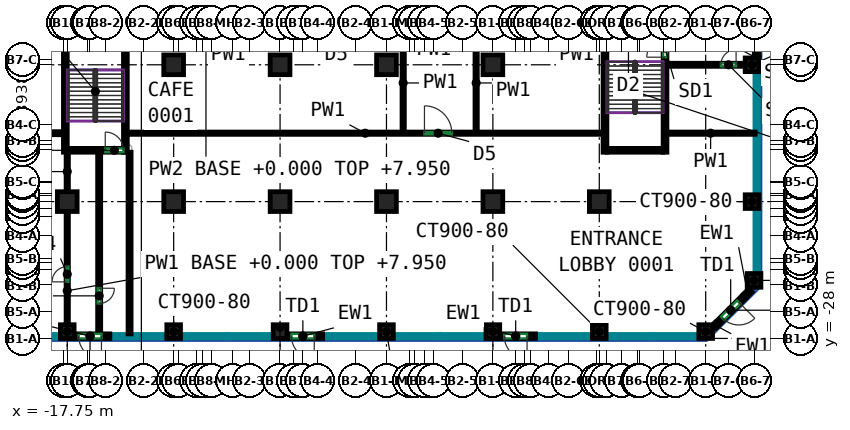
"""IFC4 building model, lengths in metres.
Left out: names, types, materials, properties, quantities, classifications, styles, units other than length and angle.
Written with IfcOpenShell. Run it as: python <this file> out.ifc"""

import sys

from ifc_helpers import new_model, si_unit, direction, frame, frame_2d, origin, origin_2d, place, context, subcontext, project, spatial, rectangle, extrude, source, transform, mapped, element, fill, save


model = new_model("IFC4")
c1 = context("Model", 3, precision=1e-05, world=origin(), true_north=direction((0.0, 1.0)))
c2 = subcontext(c1, "Body", "Model", "MODEL_VIEW")
j1 = project(units=[si_unit("LENGTHUNIT", "METRE"), si_unit("PLANEANGLEUNIT", "RADIAN")], contexts=[c1])
p1 = place(None, origin())
s1 = spatial("IfcSite", under=j1, at=p1, CompositionType="ELEMENT")
p2 = place(p1, origin())
s2 = spatial("IfcBuilding", under=s1, at=p2, CompositionType="ELEMENT")
p3 = place(p2, origin())
s3 = spatial("IfcBuildingStorey", under=s2, at=p3, CompositionType="ELEMENT", Elevation=0.0)
m1 = source(origin(), c2, "Body", "SweptSolid", [
    extrude(rectangle(XDim=0.9, YDim=0.9, at=origin_2d()), origin(), (0.0, 0.0, 1.0), 8.6),
])
p4 = place(p3, frame((-17.5, -27.55, 0.0), z_axis=(0.0, 0.0, 1.0), x_axis=(1.0, 0.0, 0.0)))
e1 = element("IfcColumn", 1, at=p4, inside=s3, PredefinedType="COLUMN", context=c2, shape_type="MappedRepresentation", body=[
    mapped(m1, transform((0.0, 0.0, 0.0))),
])
m2 = source(origin(), c2, "Body", "SweptSolid", [
    extrude(rectangle(XDim=1.3, YDim=1.3, at=origin_2d()), origin(), (0.0, 0.0, 1.0), 8.6),
])
p5 = place(p3, frame((-17.5, -19.0, 0.0), z_axis=(0.0, 0.0, 1.0), x_axis=(1.0, 0.0, 0.0)))
e2 = element("IfcColumn", 2, at=p5, inside=s3, PredefinedType="COLUMN", context=c2, shape_type="MappedRepresentation", body=[
    mapped(m2, transform((0.0, 0.0, 0.0))),
])
p6 = place(p3, frame((-10.5, -27.55, 0.0), z_axis=(0.0, 0.0, 1.0), x_axis=(1.0, 0.0, 0.0)))
e3 = element("IfcColumn", 3, at=p6, inside=s3, PredefinedType="COLUMN", context=c2, shape_type="MappedRepresentation", body=[
    mapped(m1, transform((0.0, 0.0, 0.0))),
])
for number, where, z_axis, x_axis in (
    (4, (-10.5, -19.0, 0.0), (0.0, 0.0, 1.0), (1.0, 0.0, 0.0)),
    (5, (-10.5, -10.0, 0.0), (0.0, 0.0, 1.0), (1.0, 0.0, 0.0)),
):
    element("IfcColumn", number, at=place(p3, frame(where, z_axis=z_axis, x_axis=x_axis)), inside=s3, PredefinedType="COLUMN", context=c2, shape_type="MappedRepresentation", body=[
        mapped(m2, transform((0.0, 0.0, 0.0))),
    ])
p7 = place(p3, frame((-3.5, -27.55, 0.0), z_axis=(0.0, 0.0, 1.0), x_axis=(1.0, 0.0, 0.0)))
e6 = element("IfcColumn", 6, at=p7, inside=s3, PredefinedType="COLUMN", context=c2, shape_type="MappedRepresentation", body=[
    mapped(m1, transform((0.0, 0.0, 0.0))),
])
for number, where, z_axis, x_axis in (
    (7, (-3.5, -19.0, 0.0), (0.0, 0.0, 1.0), (1.0, 0.0, 0.0)),
    (8, (-3.5, -10.0, 0.0), (0.0, 0.0, 1.0), (1.0, 0.0, 0.0)),
):
    element("IfcColumn", number, at=place(p3, frame(where, z_axis=z_axis, x_axis=x_axis)), inside=s3, PredefinedType="COLUMN", context=c2, shape_type="MappedRepresentation", body=[
        mapped(m2, transform((0.0, 0.0, 0.0))),
    ])
p8 = place(p3, frame((3.5, -27.55, 0.0), z_axis=(0.0, 0.0, 1.0), x_axis=(1.0, 0.0, 0.0)))
e9 = element("IfcColumn", 9, at=p8, inside=s3, PredefinedType="COLUMN", context=c2, shape_type="MappedRepresentation", body=[
    mapped(m1, transform((0.0, 0.0, 0.0))),
])
for number, where, z_axis, x_axis in (
    (10, (3.5, -19.0, 0.0), (0.0, 0.0, 1.0), (1.0, 0.0, 0.0)),
    (11, (3.5, -10.0, 0.0), (0.0, 0.0, 1.0), (1.0, 0.0, 0.0)),
):
    element("IfcColumn", number, at=place(p3, frame(where, z_axis=z_axis, x_axis=x_axis)), inside=s3, PredefinedType="COLUMN", context=c2, shape_type="MappedRepresentation", body=[
        mapped(m2, transform((0.0, 0.0, 0.0))),
    ])
p9 = place(p3, frame((10.5, -27.55, 0.0), z_axis=(0.0, 0.0, 1.0), x_axis=(1.0, 0.0, 0.0)))
e12 = element("IfcColumn", 12, at=p9, inside=s3, PredefinedType="COLUMN", context=c2, shape_type="MappedRepresentation", body=[
    mapped(m1, transform((0.0, 0.0, 0.0))),
])
for number, where, z_axis, x_axis in (
    (13, (10.5, -19.0, 0.0), (0.0, 0.0, 1.0), (1.0, 0.0, 0.0)),
    (14, (10.5, -10.0, 0.0), (0.0, 0.0, 1.0), (1.0, 0.0, 0.0)),
):
    element("IfcColumn", number, at=place(p3, frame(where, z_axis=z_axis, x_axis=x_axis)), inside=s3, PredefinedType="COLUMN", context=c2, shape_type="MappedRepresentation", body=[
        mapped(m2, transform((0.0, 0.0, 0.0))),
    ])
p10 = place(p3, frame((17.5, -27.55, 0.0), z_axis=(0.0, 0.0, 1.0), x_axis=(1.0, 0.0, 0.0)))
e15 = element("IfcColumn", 15, at=p10, inside=s3, PredefinedType="COLUMN", context=c2, shape_type="MappedRepresentation", body=[
    mapped(m1, transform((0.0, 0.0, 0.0))),
])
p11 = place(p3, frame((17.5, -19.0, 0.0), z_axis=(0.0, 0.0, 1.0), x_axis=(1.0, 0.0, 0.0)))
e16 = element("IfcColumn", 16, at=p11, inside=s3, PredefinedType="COLUMN", context=c2, shape_type="MappedRepresentation", body=[
    mapped(m2, transform((0.0, 0.0, 0.0))),
])
for number, where, z_axis, x_axis in (
    (17, (24.5, -27.55, 0.0), (0.0, 0.0, 1.0), (1.0, 0.0, 0.0)),
    (18, (27.55, -19.0, 0.0), (0.0, 0.0, 1.0), (1.0, 0.0, 0.0)),
    (19, (27.55, -10.0, 0.0), (0.0, 0.0, 1.0), (1.0, 0.0, 0.0)),
    (20, (27.682, -24.182, 0.0), (0.0, 0.0, 1.0), (1.0, 0.0, 0.0)),
):
    element("IfcColumn", number, at=place(p3, frame(where, z_axis=z_axis, x_axis=x_axis)), inside=s3, PredefinedType="COLUMN", context=c2, shape_type="MappedRepresentation", body=[
        mapped(m1, transform((0.0, 0.0, 0.0))),
    ])
m3 = source(origin(), c2, "Body", "SweptSolid", [
    extrude(rectangle(XDim=8.0, YDim=0.25, at=frame_2d((4.0, 0.0))), origin(), (0.0, 0.0, 1.0), 8.6),
])
for number, where, z_axis, x_axis in (
    (21, (-17.625, -15.75, 0.0), (0.0, 0.0, 1.0), (0.0, 1.0, 0.0)),
    (22, (-13.675, -15.75, 0.0), (0.0, 0.0, 1.0), (0.0, 1.0, 0.0)),
):
    element("IfcWall", number, at=place(p3, frame(where, z_axis=z_axis, x_axis=x_axis)), inside=s3, PredefinedType="SHEAR", context=c2, shape_type="MappedRepresentation", body=[
        mapped(m3, transform((0.0, 0.0, 0.0))),
    ])
m4 = source(origin(), c2, "Body", "SweptSolid", [
    extrude(rectangle(XDim=3.7, YDim=0.25, at=frame_2d((1.85, 0.0))), origin(), (0.0, 0.0, 1.0), 8.6),
])
p12 = place(p3, frame((-17.5, -15.625, 0.0), z_axis=(0.0, 0.0, 1.0), x_axis=(1.0, 0.0, 0.0)))
e23 = element("IfcWall", 23, at=p12, inside=s3, PredefinedType="SHEAR", context=c2, shape_type="MappedRepresentation", body=[
    mapped(m4, transform((0.0, 0.0, 0.0))),
])
p13 = place(p12, frame((2.5, 0.0, 0.0)))
e24 = element("IfcOpeningElement", 24, at=p13, cuts=e23, PredefinedType="OPENING", context=c2, shape_type="SweptSolid", body=[
    extrude(rectangle(XDim=1.2, YDim=2.1, at=frame_2d((0.6, 1.05))), frame((0.0, 0.135, 0.0), z_axis=(0.0, -1.0, 0.0), x_axis=(1.0, 0.0, 0.0)), (0.0, 0.0, 1.0), 0.27),
])
p14 = place(p3, frame((17.875, -15.75, 0.0), z_axis=(0.0, 0.0, 1.0), x_axis=(0.0, 1.0, 0.0)))
e25 = element("IfcWall", 25, at=p14, inside=s3, PredefinedType="SHEAR", context=c2, shape_type="MappedRepresentation", body=[
    mapped(m3, transform((0.0, 0.0, 0.0))),
])
p15 = place(p3, frame((21.825, -15.75, 0.0), z_axis=(0.0, 0.0, 1.0), x_axis=(0.0, 1.0, 0.0)))
e26 = element("IfcWall", 26, at=p15, inside=s3, PredefinedType="SHEAR", context=c2, shape_type="MappedRepresentation", body=[
    mapped(m3, transform((0.0, 0.0, 0.0))),
])
p16 = place(p15, frame((6.25, 0.0, 0.0)))
e27 = element("IfcOpeningElement", 27, at=p16, cuts=e26, PredefinedType="OPENING", context=c2, shape_type="SweptSolid", body=[
    extrude(rectangle(XDim=1.2, YDim=2.1, at=frame_2d((0.6, 1.05))), frame((0.0, 0.135, 0.0), z_axis=(0.0, -1.0, 0.0), x_axis=(1.0, 0.0, 0.0)), (0.0, 0.0, 1.0), 0.27),
])
p17 = place(p3, frame((18.0, -15.625, 0.0), z_axis=(0.0, 0.0, 1.0), x_axis=(1.0, 0.0, 0.0)))
e28 = element("IfcWall", 28, at=p17, inside=s3, PredefinedType="SHEAR", context=c2, shape_type="MappedRepresentation", body=[
    mapped(m4, transform((0.0, 0.0, 0.0))),
])
m5 = source(origin(), c2, "Body", "SweptSolid", [
    extrude(rectangle(XDim=11.95, YDim=0.2, at=frame_2d((5.975, 0.0))), origin(), (0.0, 0.0, 1.0), 8.6),
])
p18 = place(p3, frame((-15.4, -15.75, 0.0), z_axis=(0.0, 0.0, 1.0), x_axis=(0.0, -1.0, 0.0)))
e29 = element("IfcWall", 29, at=p18, inside=s3, PredefinedType="SHEAR", context=c2, shape_type="MappedRepresentation", body=[
    mapped(m5, transform((0.0, 0.0, 0.0))),
])
p19 = place(p18, frame((8.95, 0.0, 0.0)))
e30 = element("IfcOpeningElement", 30, at=p19, cuts=e29, PredefinedType="OPENING", context=c2, shape_type="SweptSolid", body=[
    extrude(rectangle(XDim=1.0, YDim=2.1, at=frame_2d((0.5, 1.05))), frame((0.0, 0.11, 0.0), z_axis=(0.0, -1.0, 0.0), x_axis=(1.0, 0.0, 0.0)), (0.0, 0.0, 1.0), 0.22),
])
p20 = place(p3, frame((-13.4, -15.75, 0.0), z_axis=(0.0, 0.0, 1.0), x_axis=(0.0, -1.0, 0.0)))
e31 = element("IfcWall", 31, at=p20, inside=s3, PredefinedType="SHEAR", context=c2, shape_type="MappedRepresentation", body=[
    mapped(m5, transform((0.0, 0.0, 0.0))),
])
m6 = source(origin(), c2, "Body", "SweptSolid", [
    extrude(rectangle(XDim=5.75, YDim=0.2, at=frame_2d((2.875, 0.0))), origin(), (0.0, 0.0, 1.0), 8.6),
])
p21 = place(p3, frame((21.95, -10.0, 0.0), z_axis=(0.0, 0.0, 1.0), x_axis=(1.0, 0.0, 0.0)))
e32 = element("IfcWall", 32, at=p21, inside=s3, PredefinedType="SHEAR", context=c2, shape_type="MappedRepresentation", body=[
    mapped(m6, transform((0.0, 0.0, 0.0))),
])
p22 = place(p21, frame((3.55, 0.0, 0.0)))
e33 = element("IfcOpeningElement", 33, at=p22, cuts=e32, PredefinedType="OPENING", context=c2, shape_type="SweptSolid", body=[
    extrude(rectangle(XDim=1.0, YDim=2.1, at=frame_2d((0.5, 1.05))), frame((0.0, 0.11, 0.0), z_axis=(0.0, -1.0, 0.0), x_axis=(1.0, 0.0, 0.0)), (0.0, 0.0, 1.0), 0.22),
])
m7 = source(origin(), c2, "Body", "SweptSolid", [
    extrude(rectangle(XDim=2.6, YDim=0.3, at=frame_2d((1.3, 0.0))), origin(), (0.0, 0.0, 1.0), 8.6),
])
p23 = place(p3, frame((-14.7, -27.85, 0.0), z_axis=(0.0, 0.0, 1.0), x_axis=(-1.0, 0.0, 0.0)))
e34 = element("IfcWall", 34, at=p23, inside=s3, PredefinedType="SOLIDWALL", context=c2, shape_type="MappedRepresentation", body=[
    mapped(m7, transform((0.0, 0.0, 0.0))),
])
p24 = place(p23, frame((0.55, 0.0, 0.0)))
e35 = element("IfcOpeningElement", 35, at=p24, cuts=e34, PredefinedType="OPENING", context=c2, shape_type="SweptSolid", body=[
    extrude(rectangle(XDim=1.5, YDim=2.4, at=frame_2d((0.75, 1.2))), frame((0.0, 0.16, 0.0), z_axis=(0.0, -1.0, 0.0), x_axis=(1.0, 0.0, 0.0)), (0.0, 0.0, 1.0), 0.32),
])
p25 = place(p3, frame((-0.7, -27.85, 0.0), z_axis=(0.0, 0.0, 1.0), x_axis=(-1.0, 0.0, 0.0)))
e36 = element("IfcWall", 36, at=p25, inside=s3, PredefinedType="SOLIDWALL", context=c2, shape_type="MappedRepresentation", body=[
    mapped(m7, transform((0.0, 0.0, 0.0))),
])
p26 = place(p25, frame((0.55, 0.0, 0.0)))
e37 = element("IfcOpeningElement", 37, at=p26, cuts=e36, PredefinedType="OPENING", context=c2, shape_type="SweptSolid", body=[
    extrude(rectangle(XDim=1.5, YDim=2.4, at=frame_2d((0.75, 1.2))), frame((0.0, 0.16, 0.0), z_axis=(0.0, -1.0, 0.0), x_axis=(1.0, 0.0, 0.0)), (0.0, 0.0, 1.0), 0.32),
])
p27 = place(p3, frame((13.3, -27.85, 0.0), z_axis=(0.0, 0.0, 1.0), x_axis=(-1.0, 0.0, 0.0)))
e38 = element("IfcWall", 38, at=p27, inside=s3, PredefinedType="SOLIDWALL", context=c2, shape_type="MappedRepresentation", body=[
    mapped(m7, transform((0.0, 0.0, 0.0))),
])
p28 = place(p27, frame((0.55, 0.0, 0.0)))
e39 = element("IfcOpeningElement", 39, at=p28, cuts=e38, PredefinedType="OPENING", context=c2, shape_type="SweptSolid", body=[
    extrude(rectangle(XDim=1.5, YDim=2.4, at=frame_2d((0.75, 1.2))), frame((0.0, 0.16, 0.0), z_axis=(0.0, -1.0, 0.0), x_axis=(1.0, 0.0, 0.0)), (0.0, 0.0, 1.0), 0.32),
])
m8 = source(origin(), c2, "Body", "SweptSolid", [
    extrude(rectangle(XDim=0.22, YDim=0.3, at=frame_2d((0.11, 0.0))), origin(), (0.0, 0.0, 1.0), 8.6),
])
p29 = place(p3, frame((25.069, -27.219, 0.0), z_axis=(0.0, 0.0, 1.0), x_axis=(0.707106781187, 0.707106781187, 0.0)))
e40 = element("IfcWall", 40, at=p29, inside=s3, PredefinedType="SOLIDWALL", context=c2, shape_type="MappedRepresentation", body=[
    mapped(m8, transform((0.0, 0.0, 0.0))),
])
p30 = place(p3, frame((27.063, -25.225, 0.0), z_axis=(0.0, 0.0, 1.0), x_axis=(-0.707106781187, -0.707106781187, 0.0)))
e41 = element("IfcWall", 41, at=p30, inside=s3, PredefinedType="SOLIDWALL", context=c2, shape_type="MappedRepresentation", body=[
    mapped(m7, transform((0.0, 0.0, 0.0))),
])
p31 = place(p30, frame((0.55, 0.0, 0.0)))
e42 = element("IfcOpeningElement", 42, at=p31, cuts=e41, PredefinedType="OPENING", context=c2, shape_type="SweptSolid", body=[
    extrude(rectangle(XDim=1.5, YDim=2.4, at=frame_2d((0.75, 1.2))), frame((0.0, 0.16, 0.0), z_axis=(0.0, -1.0, 0.0), x_axis=(1.0, 0.0, 0.0)), (0.0, 0.0, 1.0), 0.32),
])
m9 = source(origin(), c2, "Body", "SweptSolid", [
    extrude(rectangle(XDim=0.538, YDim=0.3, at=frame_2d((0.269, 0.0))), origin(), (0.0, 0.0, 1.0), 8.6),
])
p32 = place(p3, frame((27.063, -25.225, 0.0), z_axis=(0.0, 0.0, 1.0), x_axis=(0.707333454284, 0.706880035403, 0.0)))
e43 = element("IfcWall", 43, at=p32, inside=s3, PredefinedType="SOLIDWALL", context=c2, shape_type="MappedRepresentation", body=[
    mapped(m9, transform((0.0, 0.0, 0.0))),
])
m10 = source(origin(), c2, "Body", "SweptSolid", [
    extrude(rectangle(XDim=0.25, YDim=0.3, at=frame_2d((0.125, 0.0))), origin(), (0.0, 0.0, 1.0), 8.6),
])
p33 = place(p3, frame((27.85, -9.55, 0.0), z_axis=(0.0, 0.0, 1.0), x_axis=(0.0, 1.0, 0.0)))
e44 = element("IfcWall", 44, at=p33, inside=s3, PredefinedType="SOLIDWALL", context=c2, shape_type="MappedRepresentation", body=[
    mapped(m10, transform((0.0, 0.0, 0.0))),
])
p34 = place(p3, frame((27.85, -6.7, 0.0), z_axis=(0.0, 0.0, 1.0), x_axis=(0.0, -1.0, 0.0)))
e45 = element("IfcWall", 45, at=p34, inside=s3, PredefinedType="SOLIDWALL", context=c2, shape_type="MappedRepresentation", body=[
    mapped(m7, transform((0.0, 0.0, 0.0))),
])
p35 = place(p34, frame((0.55, 0.0, 0.0)))
e46 = element("IfcOpeningElement", 46, at=p35, cuts=e45, PredefinedType="OPENING", context=c2, shape_type="SweptSolid", body=[
    extrude(rectangle(XDim=1.5, YDim=2.4, at=frame_2d((0.75, 1.2))), frame((0.0, 0.16, 0.0), z_axis=(0.0, -1.0, 0.0), x_axis=(1.0, 0.0, 0.0)), (0.0, 0.0, 1.0), 0.32),
])
p36 = place(p3, frame((21.9, -14.5, 0.0), z_axis=(0.0, 0.0, 1.0), x_axis=(1.0, 0.0, 0.0)))
e47 = element("IfcWall", 47, at=p36, inside=s3, PredefinedType="PARTITIONING", context=c2, shape_type="SweptSolid", body=[
    extrude(rectangle(XDim=5.85, YDim=0.15, at=frame_2d((2.925, 0.0))), origin(), (0.0, 0.0, 1.0), 8.6),
])
p37 = place(p3, frame((-13.6, -14.5, 0.0), z_axis=(0.0, 0.0, 1.0), x_axis=(1.0, 0.0, 0.0)))
e48 = element("IfcWall", 48, at=p37, inside=s3, PredefinedType="PARTITIONING", context=c2, shape_type="SweptSolid", body=[
    extrude(rectangle(XDim=31.4, YDim=0.15, at=frame_2d((15.7, 0.0))), origin(), (0.0, 0.0, 1.0), 8.6),
])
p38 = place(p37, frame((19.599, 0.0, 0.0)))
e49 = element("IfcOpeningElement", 49, at=p38, cuts=e48, PredefinedType="OPENING", context=c2, shape_type="SweptSolid", body=[
    extrude(rectangle(XDim=1.8, YDim=2.1, at=frame_2d((0.9, 1.05))), frame((0.0, 0.085, 0.0), z_axis=(0.0, -1.0, 0.0), x_axis=(1.0, 0.0, 0.0)), (0.0, 0.0, 1.0), 0.17),
])
p39 = place(p3, frame((-17.5, -27.1, 0.0), z_axis=(0.0, 0.0, 1.0), x_axis=(0.0, 1.0, 0.0)))
e50 = element("IfcWall", 50, at=p39, inside=s3, PredefinedType="PARTITIONING", context=c2, shape_type="SweptSolid", body=[
    extrude(rectangle(XDim=7.45, YDim=0.15, at=frame_2d((3.725, 0.0))), origin(), (0.0, 0.0, 1.0), 7.95),
])
p40 = place(p39, frame((2.822, 0.0, 0.0)))
e51 = element("IfcOpeningElement", 51, at=p40, cuts=e50, PredefinedType="OPENING", context=c2, shape_type="SweptSolid", body=[
    extrude(rectangle(XDim=1.0, YDim=2.1, at=frame_2d((0.5, 1.05))), frame((0.0, 0.085, 0.0), z_axis=(0.0, -1.0, 0.0), x_axis=(1.0, 0.0, 0.0)), (0.0, 0.0, 1.0), 0.17),
])
p41 = place(p3, frame((-17.5, -18.35, 0.0), z_axis=(0.0, 0.0, 1.0), x_axis=(0.0, 1.0, 0.0)))
e52 = element("IfcWall", 52, at=p41, inside=s3, PredefinedType="PARTITIONING", context=c2, shape_type="SweptSolid", body=[
    extrude(rectangle(XDim=2.65, YDim=0.15, at=frame_2d((1.325, 0.0))), origin(), (0.0, 0.0, 1.0), 8.6),
])
for number, where, z_axis, x_axis in (
    (53, (4.6, -14.425, 0.0), (0.0, 0.0, 1.0), (0.0, 1.0, 0.0)),
    (54, (9.4, -14.425, 0.0), (0.0, 0.0, 1.0), (0.0, 1.0, 0.0)),
):
    element("IfcWall", number, at=place(p3, frame(where, z_axis=z_axis, x_axis=x_axis)), inside=s3, PredefinedType="PARTITIONING", context=c2, shape_type="SweptSolid", body=[
        extrude(rectangle(XDim=6.459, YDim=0.15, at=frame_2d((3.229, 0.0))), origin(), (0.0, 0.0, 1.0), 8.6),
    ])
p42 = place(p3, frame((-17.7, -14.5, 0.0), z_axis=(0.0, 0.0, 1.0), x_axis=(-1.0, 0.0, 0.0)))
e55 = element("IfcWall", 55, at=p42, inside=s3, PredefinedType="PARTITIONING", context=c2, shape_type="SweptSolid", body=[
    extrude(rectangle(XDim=10.05, YDim=0.2, at=frame_2d((5.025, 0.0))), origin(), (0.0, 0.0, 1.0), 8.6),
])
p43 = place(p24, origin())
e56 = element("IfcDoor", 56, at=p43, inside=s3, OperationType="DOUBLE_DOOR_SINGLE_SWING", PredefinedType="DOOR", context=c2, shape_type="SweptSolid", body=[
    extrude(rectangle(XDim=1.5, YDim=2.4, at=frame_2d((0.75, 1.2))), frame((0.0, 0.025, 0.0), z_axis=(0.0, -1.0, 0.0), x_axis=(1.0, 0.0, 0.0)), (0.0, 0.0, 1.0), 0.05),
])
fill(e35, e56)
p44 = place(p26, origin())
e57 = element("IfcDoor", 57, at=p44, inside=s3, OperationType="DOUBLE_DOOR_SINGLE_SWING", PredefinedType="DOOR", context=c2, shape_type="SweptSolid", body=[
    extrude(rectangle(XDim=1.5, YDim=2.4, at=frame_2d((0.75, 1.2))), frame((0.0, 0.025, 0.0), z_axis=(0.0, -1.0, 0.0), x_axis=(1.0, 0.0, 0.0)), (0.0, 0.0, 1.0), 0.05),
])
fill(e37, e57)
p45 = place(p28, origin())
e58 = element("IfcDoor", 58, at=p45, inside=s3, OperationType="DOUBLE_DOOR_SINGLE_SWING", PredefinedType="DOOR", context=c2, shape_type="SweptSolid", body=[
    extrude(rectangle(XDim=1.5, YDim=2.4, at=frame_2d((0.75, 1.2))), frame((0.0, 0.025, 0.0), z_axis=(0.0, -1.0, 0.0), x_axis=(1.0, 0.0, 0.0)), (0.0, 0.0, 1.0), 0.05),
])
fill(e39, e58)
p46 = place(p31, origin())
e59 = element("IfcDoor", 59, at=p46, inside=s3, OperationType="DOUBLE_DOOR_SINGLE_SWING", PredefinedType="DOOR", context=c2, shape_type="SweptSolid", body=[
    extrude(rectangle(XDim=1.5, YDim=2.4, at=frame_2d((0.75, 1.2))), frame((0.0, 0.025, 0.0), z_axis=(0.0, -1.0, 0.0), x_axis=(1.0, 0.0, 0.0)), (0.0, 0.0, 1.0), 0.05),
])
fill(e42, e59)
p47 = place(p13, origin())
e60 = element("IfcDoor", 60, at=p47, inside=s3, OperationType="DOUBLE_DOOR_SINGLE_SWING", PredefinedType="DOOR", context=c2, shape_type="SweptSolid", body=[
    extrude(rectangle(XDim=1.2, YDim=2.1, at=frame_2d((0.6, 1.05))), frame((0.0, 0.025, 0.0), z_axis=(0.0, -1.0, 0.0), x_axis=(1.0, 0.0, 0.0)), (0.0, 0.0, 1.0), 0.05),
])
fill(e24, e60)
p48 = place(p19, origin())
e61 = element("IfcDoor", 61, at=p48, inside=s3, OperationType="SINGLE_SWING_LEFT", PredefinedType="DOOR", context=c2, shape_type="SweptSolid", body=[
    extrude(rectangle(XDim=1.0, YDim=2.1, at=frame_2d((0.5, 1.05))), frame((0.0, 0.025, 0.0), z_axis=(0.0, -1.0, 0.0), x_axis=(1.0, 0.0, 0.0)), (0.0, 0.0, 1.0), 0.05),
])
fill(e30, e61)
p49 = place(p16, origin())
e62 = element("IfcDoor", 62, at=p49, inside=s3, OperationType="DOUBLE_DOOR_SINGLE_SWING", PredefinedType="DOOR", context=c2, shape_type="SweptSolid", body=[
    extrude(rectangle(XDim=1.2, YDim=2.1, at=frame_2d((0.6, 1.05))), frame((0.0, 0.025, 0.0), z_axis=(0.0, -1.0, 0.0), x_axis=(1.0, 0.0, 0.0)), (0.0, 0.0, 1.0), 0.05),
])
fill(e27, e62)
p50 = place(p22, origin())
e63 = element("IfcDoor", 63, at=p50, inside=s3, OperationType="SINGLE_SWING_RIGHT", PredefinedType="DOOR", context=c2, shape_type="SweptSolid", body=[
    extrude(rectangle(XDim=1.0, YDim=2.1, at=frame_2d((0.5, 1.05))), frame((0.0, 0.025, 0.0), z_axis=(0.0, -1.0, 0.0), x_axis=(1.0, 0.0, 0.0)), (0.0, 0.0, 1.0), 0.05),
])
fill(e33, e63)
p51 = place(p40, origin())
e64 = element("IfcDoor", 64, at=p51, inside=s3, OperationType="SINGLE_SWING_LEFT", PredefinedType="DOOR", context=c2, shape_type="SweptSolid", body=[
    extrude(rectangle(XDim=1.0, YDim=2.1, at=frame_2d((0.5, 1.05))), frame((0.0, 0.025, 0.0), z_axis=(0.0, -1.0, 0.0), x_axis=(1.0, 0.0, 0.0)), (0.0, 0.0, 1.0), 0.05),
])
fill(e51, e64)
p52 = place(p38, origin())
e65 = element("IfcDoor", 65, at=p52, inside=s3, OperationType="DOUBLE_DOOR_SINGLE_SWING", PredefinedType="DOOR", context=c2, shape_type="SweptSolid", body=[
    extrude(rectangle(XDim=1.8, YDim=2.1, at=frame_2d((0.9, 1.05))), frame((0.0, 0.025, 0.0), z_axis=(0.0, -1.0, 0.0), x_axis=(1.0, 0.0, 0.0)), (0.0, 0.0, 1.0), 0.05),
])
fill(e49, e65)
save(model, sys.argv[1])
